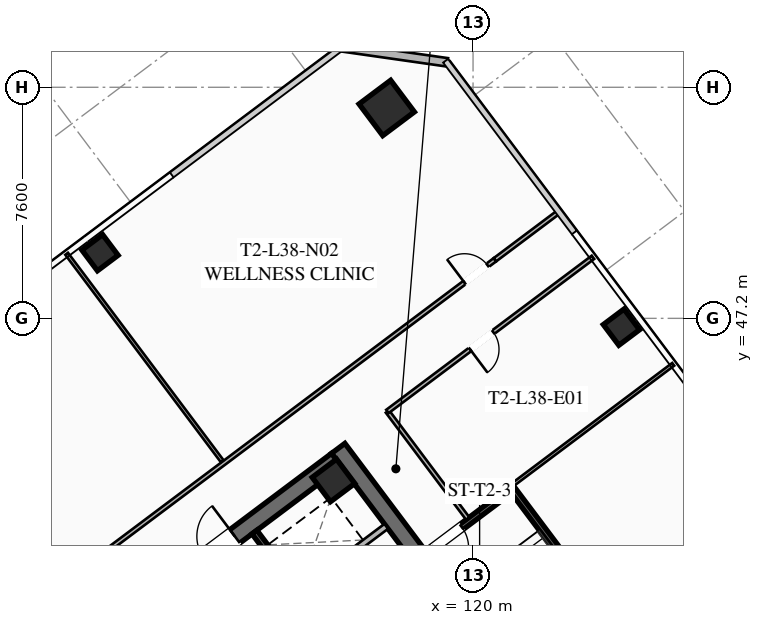
"""IFC4 building model, lengths in metres.
Left out: names, types, materials, properties, quantities, classifications, styles, units other than length and angle.
Written with IfcOpenShell. Run it as: python <this file> out.ifc"""

import sys

from ifc_helpers import new_model, si_unit, direction, frame, frame_2d, origin, origin_2d, place, context, subcontext, project, spatial, rectangle, hollow_rectangle, extrude, element, fill, save


model = new_model("IFC4")
c1 = context("Model", 3, precision=1e-05, world=origin(), true_north=direction((0.0, 1.0)))
c2 = subcontext(c1, "Body", "Model", "MODEL_VIEW")
j1 = project(units=[si_unit("LENGTHUNIT", "METRE"), si_unit("PLANEANGLEUNIT", "RADIAN")], contexts=[c1])
p1 = place(None, origin())
s1 = spatial("IfcSite", under=j1, at=p1, CompositionType="ELEMENT")
p2 = place(p1, origin())
s2 = spatial("IfcBuilding", under=s1, at=p2, CompositionType="ELEMENT")
p3 = place(p2, frame((0.0, 0.0, 142.8)))
s3 = spatial("IfcBuildingStorey", under=s2, at=p3, CompositionType="ELEMENT", Elevation=142.8)
p4 = place(p3, frame((115.564, 42.923, 0.0), z_axis=(0.0, 0.0, 1.0), x_axis=(0.600005007985, -0.799996243986, 0.0)))
e1 = element("IfcWall", 1, at=p4, inside=s3, PredefinedType="SHEAR", context=c2, shape_type="SweptSolid", body=[
    extrude(rectangle(XDim=15.6, YDim=0.55, at=frame_2d((7.8, 0.0))), origin(), (0.0, 0.0, 1.0), 3.55),
])
p5 = place(p3, frame((103.461, 33.502, 0.0), z_axis=(0.0, 0.0, 1.0), x_axis=(0.799998054672, 0.600002593761, 0.0)))
e2 = element("IfcWall", 2, at=p5, inside=s3, PredefinedType="SHEAR", context=c2, shape_type="SweptSolid", body=[
    extrude(rectangle(XDim=15.06, YDim=0.55, at=frame_2d((7.53, 0.0))), origin(), (0.0, 0.0, 1.0), 3.55),
])
p6 = place(p5, frame((4.58, 0.0, 0.0)))
e3 = element("IfcOpeningElement", 3, at=p6, cuts=e2, PredefinedType="OPENING", context=c2, shape_type="SweptSolid", body=[
    extrude(rectangle(XDim=1.25, YDim=2.25, at=frame_2d((0.625, 1.125))), frame((0.0, 0.285, 0.0), z_axis=(0.0, -1.0, 0.0), x_axis=(1.0, 0.0, 0.0)), (0.0, 0.0, 1.0), 0.57),
])
p7 = place(p5, frame((9.63, 0.0, 0.0)))
e4 = element("IfcOpeningElement", 4, at=p7, cuts=e2, PredefinedType="OPENING", context=c2, shape_type="SweptSolid", body=[
    extrude(rectangle(XDim=1.25, YDim=2.25, at=frame_2d((0.625, 1.125))), frame((0.0, 0.285, 0.0), z_axis=(0.0, -1.0, 0.0), x_axis=(1.0, 0.0, 0.0)), (0.0, 0.0, 1.0), 0.57),
])
p8 = place(p3, frame((115.41, 41.87, 0.0), z_axis=(0.0, 0.0, 1.0), x_axis=(0.799999996291, 0.600000004945, 0.0)))
e5 = element("IfcColumn", 5, at=p8, inside=s3, PredefinedType="COLUMN", context=c2, shape_type="SweptSolid", body=[
    extrude(hollow_rectangle(XDim=1.0, YDim=1.0, WallThickness=0.04, at=origin_2d()), origin(), (0.0, 0.0, 1.0), 3.37),
])
p9 = place(p3, frame((117.16, 54.12, 0.0), z_axis=(0.0, 0.0, 1.0), x_axis=(0.799999996291, 0.600000004945, 0.0)))
e6 = element("IfcColumn", 6, at=p9, inside=s3, PredefinedType="COLUMN", context=c2, shape_type="SweptSolid", body=[
    extrude(hollow_rectangle(XDim=1.3, YDim=1.3, WallThickness=0.05, at=origin_2d()), origin(), (0.0, 0.0, 1.0), 3.37),
])
for number, where, z_axis, x_axis in (
    (7, (124.88, 46.91, 0.0), (0.0, 0.0, 1.0), (0.8, 0.6, 0.0)),
    (8, (107.73, 49.36, 0.0), (0.0, 0.0, 1.0), (0.8, 0.6, 0.0)),
):
    element("IfcColumn", number, at=place(p3, frame(where, z_axis=z_axis, x_axis=x_axis)), inside=s3, PredefinedType="COLUMN", context=c2, shape_type="SweptSolid", body=[
        extrude(hollow_rectangle(XDim=0.85, YDim=0.85, WallThickness=0.035, at=origin_2d()), origin(), (0.0, 0.0, 1.0), 3.37),
    ])
p10 = place(p3, frame((115.66, 56.12, 0.0), z_axis=(0.0, 0.0, 1.0), x_axis=(0.989949493661, -0.141421356237, 0.0)))
e9 = element("IfcWall", 9, at=p10, inside=s3, PredefinedType="SOLIDWALL", context=c2, shape_type="SweptSolid", body=[
    extrude(rectangle(XDim=3.536, YDim=0.28, at=frame_2d((1.768, 0.0))), origin(), (0.0, 0.0, 1.0), 3.37),
])
p11 = place(p3, frame((112.81, 40.17, 0.0), z_axis=(0.0, 0.0, 1.0), x_axis=(0.599993943644, -0.800004542231, 0.0)))
e10 = element("IfcWall", 10, at=p11, inside=s3, PredefinedType="SHEAR", context=c2, shape_type="SweptSolid", body=[
    extrude(rectangle(XDim=6.45, YDim=0.2, at=frame_2d((3.225, 0.0))), origin(), (0.0, 0.0, 1.0), 3.37),
])
p12 = place(p3, frame((114.36, 38.27, 0.0), z_axis=(0.0, 0.0, 1.0), x_axis=(0.800008418847, 0.599988774707, 0.0)))
e11 = element("IfcWall", 11, at=p12, inside=s3, PredefinedType="SOLIDWALL", context=c2, shape_type="SweptSolid", body=[
    extrude(rectangle(XDim=3.48, YDim=0.2, at=frame_2d((1.74, 0.0))), origin(), (0.0, 0.0, 1.0), 3.37),
])
p13 = place(p3, frame((125.304, 36.228, 0.0), z_axis=(0.0, 0.0, 1.0), x_axis=(-0.59998851072, 0.800008616831, 0.0)))
e12 = element("IfcWall", 12, at=p13, inside=s3, PredefinedType="SHEAR", context=c2, shape_type="SweptSolid", body=[
    extrude(rectangle(XDim=6.8, YDim=0.2, at=frame_2d((3.4, 0.0))), origin(), (0.0, 0.0, 1.0), 3.37),
])
p14 = place(p3, frame((121.204, 41.528, 0.0), z_axis=(0.0, 0.0, 1.0), x_axis=(-0.800017232136, -0.599977023131, 0.0)))
e13 = element("IfcWall", 13, at=p14, inside=s3, PredefinedType="SHEAR", context=c2, shape_type="SweptSolid", body=[
    extrude(rectangle(XDim=3.4, YDim=0.2, at=frame_2d((1.7, 0.0))), origin(), (0.0, 0.0, 1.0), 3.37),
])
p15 = place(p14, frame((1.975, 0.0, 0.0)))
e14 = element("IfcOpeningElement", 14, at=p15, cuts=e13, PredefinedType="OPENING", context=c2, shape_type="SweptSolid", body=[
    extrude(rectangle(XDim=1.15, YDim=2.2, at=frame_2d((0.575, 1.1))), frame((0.0, 0.11, 0.0), z_axis=(0.0, -1.0, 0.0), x_axis=(1.0, 0.0, 0.0)), (0.0, 0.0, 1.0), 0.22),
])
p16 = place(p3, frame((119.824, 40.618, 0.0), z_axis=(0.0, 0.0, 1.0), x_axis=(-0.599982243973, 0.800013316712, 0.0)))
e15 = element("IfcWall", 15, at=p16, inside=s3, PredefinedType="PARTITIONING", context=c2, shape_type="SweptSolid", body=[
    extrude(rectangle(XDim=4.4, YDim=0.135, at=frame_2d((2.2, 0.0))), origin(), (0.0, 0.0, 1.0), 2.723),
])
p17 = place(p3, frame((95.678, 30.346, 0.0), z_axis=(0.0, 0.0, 1.0), x_axis=(0.8, 0.6, 0.0)))
e16 = element("IfcWall", 16, at=p17, inside=s3, PredefinedType="PARTITIONING", context=c2, shape_type="SweptSolid", body=[
    extrude(rectangle(XDim=31.3, YDim=0.135, at=frame_2d((15.65, 0.0))), origin(), (0.0, 0.0, 1.0), 2.723),
])
p18 = place(p17, frame((0.3, 0.0, 0.0)))
e17 = element("IfcOpeningElement", 17, at=p18, cuts=e16, PredefinedType="OPENING", context=c2, shape_type="SweptSolid", body=[
    extrude(rectangle(XDim=0.95, YDim=2.05, at=frame_2d((0.475, 1.025))), frame((0.0, 0.077, 0.0), z_axis=(0.0, -1.0, 0.0), x_axis=(1.0, 0.0, 0.0)), (0.0, 0.0, 1.0), 0.155),
])
p19 = place(p17, frame((30.05, 0.0, 0.0)))
e18 = element("IfcOpeningElement", 18, at=p19, cuts=e16, PredefinedType="OPENING", context=c2, shape_type="SweptSolid", body=[
    extrude(rectangle(XDim=0.95, YDim=2.05, at=frame_2d((0.475, 1.025))), frame((0.0, 0.077, 0.0), z_axis=(0.0, -1.0, 0.0), x_axis=(1.0, 0.0, 0.0)), (0.0, 0.0, 1.0), 0.155),
])
p20 = place(p3, frame((120.718, 49.126, 0.0), z_axis=(0.0, 0.0, 1.0), x_axis=(0.799977721118, 0.600029704027, 0.0)))
e19 = element("IfcWall", 19, at=p20, inside=s3, PredefinedType="PARTITIONING", context=c2, shape_type="SweptSolid", body=[
    extrude(rectangle(XDim=2.63, YDim=0.135, at=frame_2d((1.315, 0.0))), origin(), (0.0, 0.0, 1.0), 2.723),
])
p21 = place(p3, frame((111.75, 42.5, 0.0), z_axis=(0.0, 0.0, 1.0), x_axis=(-0.599995420528, 0.800003434584, 0.0)))
e20 = element("IfcWall", 20, at=p21, inside=s3, PredefinedType="PARTITIONING", context=c2, shape_type="SweptSolid", body=[
    extrude(rectangle(XDim=8.53, YDim=0.11, at=frame_2d((4.265, 0.0))), origin(), (0.0, 0.0, 1.0), 2.723),
])
p22 = place(p3, frame((123.944, 49.208, 0.0), z_axis=(0.0, 0.0, 1.0), x_axis=(-0.799996532921, -0.600004622744, 0.0)))
e21 = element("IfcWall", 21, at=p22, inside=s3, PredefinedType="PARTITIONING", context=c2, shape_type="SweptSolid", body=[
    extrude(rectangle(XDim=8.45, YDim=0.135, at=frame_2d((4.225, 0.0))), origin(), (0.0, 0.0, 1.0), 2.723),
])
p23 = place(p22, frame((4.1, 0.0, 0.0)))
e22 = element("IfcOpeningElement", 22, at=p23, cuts=e21, PredefinedType="OPENING", context=c2, shape_type="SweptSolid", body=[
    extrude(rectangle(XDim=0.95, YDim=2.05, at=frame_2d((0.475, 1.025))), frame((0.0, 0.077, 0.0), z_axis=(0.0, -1.0, 0.0), x_axis=(1.0, 0.0, 0.0)), (0.0, 0.0, 1.0), 0.155),
])
p24 = place(p3, frame((126.584, 45.688, 0.0), z_axis=(0.0, 0.0, 1.0), x_axis=(-0.800004438899, -0.599994081423, 0.0)))
e23 = element("IfcWall", 23, at=p24, inside=s3, PredefinedType="PARTITIONING", context=c2, shape_type="SweptSolid", body=[
    extrude(rectangle(XDim=6.6, YDim=0.11, at=frame_2d((3.3, 0.0))), origin(), (0.0, 0.0, 1.0), 2.723),
])
p25 = place(p7, origin())
e24 = element("IfcDoor", 24, at=p25, inside=s3, OperationType="SINGLE_SWING_RIGHT", PredefinedType="DOOR", context=c2, shape_type="SweptSolid", body=[
    extrude(rectangle(XDim=1.25, YDim=2.25, at=frame_2d((0.625, 1.125))), frame((0.0, 0.025, 0.0), z_axis=(0.0, -1.0, 0.0), x_axis=(1.0, 0.0, 0.0)), (0.0, 0.0, 1.0), 0.05),
])
fill(e4, e24)
p26 = place(p15, origin())
e25 = element("IfcDoor", 25, at=p26, inside=s3, OperationType="SINGLE_SWING_RIGHT", PredefinedType="DOOR", context=c2, shape_type="SweptSolid", body=[
    extrude(rectangle(XDim=1.15, YDim=2.2, at=frame_2d((0.575, 1.1))), frame((0.0, 0.025, 0.0), z_axis=(0.0, -1.0, 0.0), x_axis=(1.0, 0.0, 0.0)), (0.0, 0.0, 1.0), 0.05),
])
fill(e14, e25)
p27 = place(p19, origin())
e26 = element("IfcDoor", 26, at=p27, inside=s3, OperationType="SINGLE_SWING_LEFT", PredefinedType="DOOR", context=c2, shape_type="SweptSolid", body=[
    extrude(rectangle(XDim=0.95, YDim=2.05, at=frame_2d((0.475, 1.025))), frame((0.0, 0.025, 0.0), z_axis=(0.0, -1.0, 0.0), x_axis=(1.0, 0.0, 0.0)), (0.0, 0.0, 1.0), 0.05),
])
fill(e18, e26)
p28 = place(p23, origin())
e27 = element("IfcDoor", 27, at=p28, inside=s3, OperationType="SINGLE_SWING_RIGHT", PredefinedType="DOOR", context=c2, shape_type="SweptSolid", body=[
    extrude(rectangle(XDim=0.95, YDim=2.05, at=frame_2d((0.475, 1.025))), frame((0.0, 0.025, 0.0), z_axis=(0.0, -1.0, 0.0), x_axis=(1.0, 0.0, 0.0)), (0.0, 0.0, 1.0), 0.05),
])
fill(e22, e27)
save(model, sys.argv[1])
